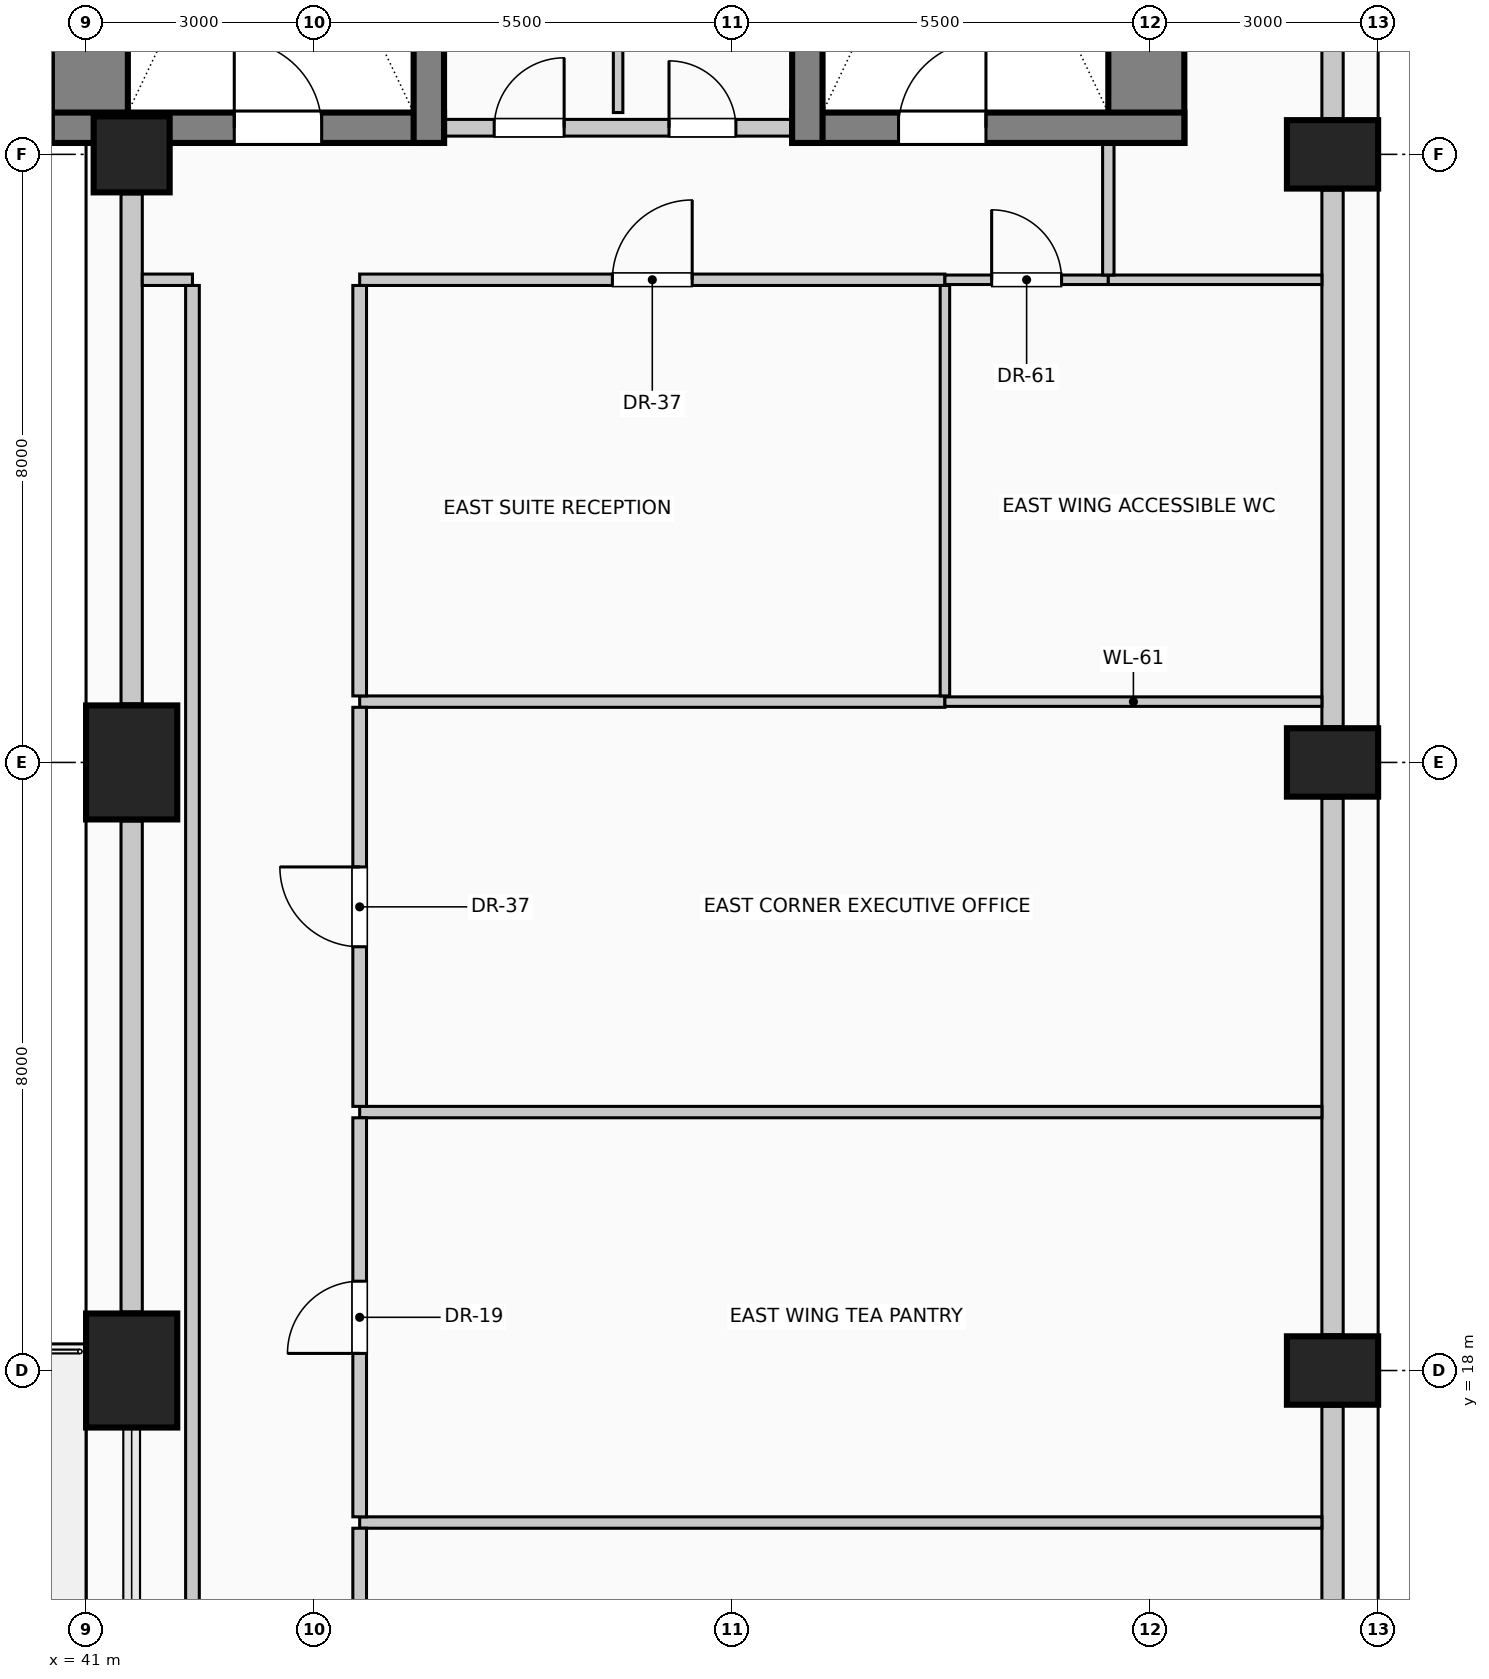
"""IFC4 building model, lengths in metres.
Left out: names, types, materials, properties, quantities, classifications, styles, units other than length and angle.
Written with IfcOpenShell. Run it as: python <this file> out.ifc"""

import sys

from ifc_helpers import new_model, si_unit, direction, frame, frame_2d, origin, origin_2d, place, context, subcontext, project, spatial, rectangle, circle, extrude, element, fill, save


model = new_model("IFC4")
c1 = context("Model", 3, precision=1e-05, world=origin(), true_north=direction((0.0, 1.0)))
c2 = subcontext(c1, "Body", "Model", "MODEL_VIEW")
j1 = project(units=[si_unit("LENGTHUNIT", "METRE"), si_unit("PLANEANGLEUNIT", "RADIAN")], contexts=[c1])
p1 = place(None, origin())
s1 = spatial("IfcSite", under=j1, at=p1, CompositionType="ELEMENT")
p2 = place(p1, origin())
s2 = spatial("IfcBuilding", under=s1, at=p2, CompositionType="ELEMENT")
p3 = place(p2, frame((0.0, 0.0, 22.6)))
s3 = spatial("IfcBuildingStorey", under=s2, at=p3, CompositionType="ELEMENT", Elevation=22.6)
for number, where, z_axis, x_axis in (
    (1, (41.05, 34.15, 0.0), (0.0, 0.0, 1.0), (0.0, 1.0, 0.0)),
    (2, (54.95, 34.15, 0.0), (0.0, 0.0, 1.0), (0.0, 1.0, 0.0)),
):
    element("IfcWall", number, at=place(p3, frame(where, z_axis=z_axis, x_axis=x_axis)), inside=s3, PredefinedType="SHEAR", context=c2, shape_type="SweptSolid", body=[
        extrude(rectangle(XDim=9.28, YDim=1.0, at=frame_2d((4.64, 0.0))), origin(), (0.0, 0.0, 1.0), 4.0),
    ])
p4 = place(p3, frame((40.55, 34.35, 0.0), z_axis=(0.0, 0.0, 1.0), x_axis=(1.0, 0.0, 0.0)))
e3 = element("IfcWall", 3, at=p4, inside=s3, PredefinedType="SHEAR", context=c2, shape_type="SweptSolid", body=[
    extrude(rectangle(XDim=5.16, YDim=0.4, at=frame_2d((2.58, 0.0))), origin(), (0.0, 0.0, 1.0), 4.0),
])
p5 = place(p4, frame((2.4, 0.0, 0.0)))
e4 = element("IfcOpeningElement", 4, at=p5, cuts=e3, PredefinedType="OPENING", context=c2, shape_type="SweptSolid", body=[
    extrude(rectangle(XDim=1.15, YDim=2.2, at=frame_2d((0.575, 1.1))), frame((0.0, 0.21, 0.0), z_axis=(0.0, -1.0, 0.0), x_axis=(1.0, 0.0, 0.0)), (0.0, 0.0, 1.0), 0.42),
])
p6 = place(p3, frame((45.51, 34.15, 0.0), z_axis=(0.0, 0.0, 1.0), x_axis=(0.0, 1.0, 0.0)))
e5 = element("IfcWall", 5, at=p6, inside=s3, PredefinedType="SHEAR", context=c2, shape_type="SweptSolid", body=[
    extrude(rectangle(XDim=9.28, YDim=0.4, at=frame_2d((4.64, 0.0))), origin(), (0.0, 0.0, 1.0), 4.0),
])
p7 = place(p3, frame((50.29, 34.35, 0.0), z_axis=(0.0, 0.0, 1.0), x_axis=(1.0, 0.0, 0.0)))
e6 = element("IfcWall", 6, at=p7, inside=s3, PredefinedType="SHEAR", context=c2, shape_type="SweptSolid", body=[
    extrude(rectangle(XDim=5.16, YDim=0.4, at=frame_2d((2.58, 0.0))), origin(), (0.0, 0.0, 1.0), 4.0),
])
p8 = place(p7, frame((1.4, 0.0, 0.0)))
e7 = element("IfcOpeningElement", 7, at=p8, cuts=e6, PredefinedType="OPENING", context=c2, shape_type="SweptSolid", body=[
    extrude(rectangle(XDim=1.15, YDim=2.2, at=frame_2d((0.575, 1.1))), frame((0.0, 0.21, 0.0), z_axis=(0.0, -1.0, 0.0), x_axis=(1.0, 0.0, 0.0)), (0.0, 0.0, 1.0), 0.42),
])
p9 = place(p3, frame((50.49, 34.15, 0.0), z_axis=(0.0, 0.0, 1.0), x_axis=(0.0, 1.0, 0.0)))
e8 = element("IfcWall", 8, at=p9, inside=s3, PredefinedType="SHEAR", context=c2, shape_type="SweptSolid", body=[
    extrude(rectangle(XDim=9.28, YDim=0.4, at=frame_2d((4.64, 0.0))), origin(), (0.0, 0.0, 1.0), 4.0),
])
for number, where, z_axis, x_axis in (
    (9, (57.4, 18.0, 0.0), (0.0, 0.0, 1.0), (0.0, 1.0, 0.0)),
    (10, (57.4, 26.0, 0.0), (0.0, 0.0, 1.0), (0.0, 1.0, 0.0)),
    (11, (57.4, 34.0, 0.0), (0.0, 0.0, 1.0), (0.0, 1.0, 0.0)),
):
    element("IfcColumn", number, at=place(p3, frame(where, z_axis=z_axis, x_axis=x_axis)), inside=s3, PredefinedType="COLUMN", context=c2, shape_type="SweptSolid", body=[
        extrude(rectangle(XDim=0.9, YDim=1.2, at=origin_2d()), origin(), (0.0, 0.0, 1.0), 4.0),
    ])
for number, where, z_axis, x_axis in (
    (12, (41.6, 18.0, 0.0), (0.0, 0.0, 1.0), (1.0, 0.0, 0.0)),
    (13, (41.6, 26.0, 0.0), (0.0, 0.0, 1.0), (1.0, 0.0, 0.0)),
):
    element("IfcColumn", number, at=place(p3, frame(where, z_axis=z_axis, x_axis=x_axis)), inside=s3, PredefinedType="COLUMN", context=c2, shape_type="SweptSolid", body=[
        extrude(rectangle(XDim=1.2, YDim=1.5, at=origin_2d()), origin(), (0.0, 0.0, 1.0), 4.0),
    ])
p10 = place(p3, frame((41.6, 34.0, 0.0), z_axis=(0.0, 0.0, 1.0), x_axis=(1.0, 0.0, 0.0)))
e14 = element("IfcColumn", 14, at=p10, inside=s3, PredefinedType="COLUMN", context=c2, shape_type="SweptSolid", body=[
    extrude(circle(Radius=0.5, at=origin_2d()), origin(), (0.0, 0.0, 1.0), 4.0),
])
p11 = place(p3, frame((57.4, 17.53, 0.0), z_axis=(0.0, 0.0, 1.0), x_axis=(0.0, -1.0, 0.0)))
e15 = element("IfcWall", 15, at=p11, inside=s3, PredefinedType="SOLIDWALL", context=c2, shape_type="SweptSolid", body=[
    extrude(rectangle(XDim=7.06, YDim=0.28, at=frame_2d((3.53, 0.0))), origin(), (0.0, 0.0, 1.0), 2.85),
])
p12 = place(p11, frame((3.973, 0.0, 0.42)))
e16 = element("IfcOpeningElement", 16, at=p12, cuts=e15, PredefinedType="OPENING", context=c2, shape_type="SweptSolid", body=[
    extrude(rectangle(XDim=2.2, YDim=1.95, at=frame_2d((1.1, 0.975))), frame((0.0, 0.15, 0.0), z_axis=(0.0, -1.0, 0.0), x_axis=(1.0, 0.0, 0.0)), (0.0, 0.0, 1.0), 0.3),
])
for number, where, z_axis, x_axis in (
    (17, (57.4, 25.53, 0.0), (0.0, 0.0, 1.0), (0.0, -1.0, 0.0)),
    (18, (57.4, 33.53, 0.0), (0.0, 0.0, 1.0), (0.0, -1.0, 0.0)),
):
    element("IfcWall", number, at=place(p3, frame(where, z_axis=z_axis, x_axis=x_axis)), inside=s3, PredefinedType="SOLIDWALL", context=c2, shape_type="SweptSolid", body=[
        extrude(rectangle(XDim=7.06, YDim=0.28, at=frame_2d((3.53, 0.0))), origin(), (0.0, 0.0, 1.0), 2.85),
    ])
p13 = place(p3, frame((57.4, 41.93, 0.0), z_axis=(0.0, 0.0, 1.0), x_axis=(0.0, -1.0, 0.0)))
e19 = element("IfcWall", 19, at=p13, inside=s3, PredefinedType="SOLIDWALL", context=c2, shape_type="SweptSolid", body=[
    extrude(rectangle(XDim=7.46, YDim=0.28, at=frame_2d((3.73, 0.0))), origin(), (0.0, 0.0, 1.0), 2.85),
])
p14 = place(p3, frame((41.6, 18.77, 0.0), z_axis=(0.0, 0.0, 1.0), x_axis=(0.0, 1.0, 0.0)))
e20 = element("IfcWall", 20, at=p14, inside=s3, PredefinedType="SOLIDWALL", context=c2, shape_type="SweptSolid", body=[
    extrude(rectangle(XDim=6.46, YDim=0.28, at=frame_2d((3.23, 0.0))), origin(), (0.0, 0.0, 1.0), 3.0),
])
p15 = place(p3, frame((41.6, 26.77, 0.0), z_axis=(0.0, 0.0, 1.0), x_axis=(0.0, 1.0, 0.0)))
e21 = element("IfcWall", 21, at=p15, inside=s3, PredefinedType="SOLIDWALL", context=c2, shape_type="SweptSolid", body=[
    extrude(rectangle(XDim=6.71, YDim=0.28, at=frame_2d((3.355, 0.0))), origin(), (0.0, 0.0, 1.0), 3.0),
])
p16 = place(p3, frame((45.72, 34.35, 0.0), z_axis=(0.0, 0.0, 1.0), x_axis=(1.0, 0.0, 0.0)))
e22 = element("IfcWall", 22, at=p16, inside=s3, PredefinedType="PARTITIONING", context=c2, shape_type="SweptSolid", body=[
    extrude(rectangle(XDim=4.56, YDim=0.22, at=frame_2d((2.28, 0.0))), origin(), (0.0, 0.0, 1.0), 3.7),
])
p17 = place(p16, frame((0.65, 0.0, 0.0)))
e23 = element("IfcOpeningElement", 23, at=p17, cuts=e22, PredefinedType="OPENING", context=c2, shape_type="SweptSolid", body=[
    extrude(rectangle(XDim=0.92, YDim=2.1, at=frame_2d((0.46, 1.05))), frame((0.0, 0.12, 0.0), z_axis=(0.0, -1.0, 0.0), x_axis=(1.0, 0.0, 0.0)), (0.0, 0.0, 1.0), 0.24),
])
p18 = place(p16, frame((2.95, 0.0, 0.0)))
e24 = element("IfcOpeningElement", 24, at=p18, cuts=e22, PredefinedType="OPENING", context=c2, shape_type="SweptSolid", body=[
    extrude(rectangle(XDim=0.88, YDim=2.1, at=frame_2d((0.44, 1.05))), frame((0.0, 0.12, 0.0), z_axis=(0.0, -1.0, 0.0), x_axis=(1.0, 0.0, 0.0)), (0.0, 0.0, 1.0), 0.24),
])
for number, where, z_axis, x_axis in (
    (25, (44.6, 16.0, 0.0), (0.0, 0.0, 1.0), (1.0, 0.0, 0.0)),
    (26, (44.6, 21.4, 0.0), (0.0, 0.0, 1.0), (1.0, 0.0, 0.0)),
):
    element("IfcWall", number, at=place(p3, frame(where, z_axis=z_axis, x_axis=x_axis)), inside=s3, PredefinedType="PARTITIONING", context=c2, shape_type="SweptSolid", body=[
        extrude(rectangle(XDim=12.66, YDim=0.15, at=frame_2d((6.33, 0.0))), origin(), (0.0, 0.0, 1.0), 3.7),
    ])
p19 = place(p3, frame((44.6, 26.8, 0.0), z_axis=(0.0, 0.0, 1.0), x_axis=(1.0, 0.0, 0.0)))
e27 = element("IfcWall", 27, at=p19, inside=s3, PredefinedType="PARTITIONING", context=c2, shape_type="SweptSolid", body=[
    extrude(rectangle(XDim=7.7, YDim=0.15, at=frame_2d((3.85, 0.0))), origin(), (0.0, 0.0, 1.0), 3.7),
])
p20 = place(p3, frame((52.3, 26.8, 0.0), z_axis=(0.0, 0.0, 1.0), x_axis=(1.0, 0.0, 0.0)))
e28 = element("IfcWall", 28, at=p20, inside=s3, PredefinedType="PARTITIONING", context=c2, shape_type="SweptSolid", body=[
    extrude(rectangle(XDim=4.96, YDim=0.125, at=frame_2d((2.48, 0.0))), origin(), (0.0, 0.0, 1.0), 3.7),
])
p21 = place(p3, frame((41.74, 32.35, 0.0), z_axis=(0.0, 0.0, 1.0), x_axis=(1.0, 0.0, 0.0)))
e29 = element("IfcWall", 29, at=p21, inside=s3, PredefinedType="PARTITIONING", context=c2, shape_type="SweptSolid", body=[
    extrude(rectangle(XDim=0.66, YDim=0.15, at=frame_2d((0.33, 0.0))), origin(), (0.0, 0.0, 1.0), 3.7),
])
p22 = place(p3, frame((44.6, 32.35, 0.0), z_axis=(0.0, 0.0, 1.0), x_axis=(1.0, 0.0, 0.0)))
e30 = element("IfcWall", 30, at=p22, inside=s3, PredefinedType="PARTITIONING", context=c2, shape_type="SweptSolid", body=[
    extrude(rectangle(XDim=7.7, YDim=0.15, at=frame_2d((3.85, 0.0))), origin(), (0.0, 0.0, 1.0), 3.7),
])
p23 = place(p22, frame((3.325, 0.0, 0.0)))
e31 = element("IfcOpeningElement", 31, at=p23, cuts=e30, PredefinedType="OPENING", context=c2, shape_type="SweptSolid", body=[
    extrude(rectangle(XDim=1.05, YDim=2.15, at=frame_2d((0.525, 1.075))), frame((0.0, 0.085, 0.0), z_axis=(0.0, -1.0, 0.0), x_axis=(1.0, 0.0, 0.0)), (0.0, 0.0, 1.0), 0.17),
])
p24 = place(p3, frame((52.3, 32.35, 0.0), z_axis=(0.0, 0.0, 1.0), x_axis=(1.0, 0.0, 0.0)))
e32 = element("IfcWall", 32, at=p24, inside=s3, PredefinedType="PARTITIONING", context=c2, shape_type="SweptSolid", body=[
    extrude(rectangle(XDim=2.15, YDim=0.125, at=frame_2d((1.075, 0.0))), origin(), (0.0, 0.0, 1.0), 3.7),
])
p25 = place(p24, frame((0.615, 0.0, 0.0)))
e33 = element("IfcOpeningElement", 33, at=p25, cuts=e32, PredefinedType="OPENING", context=c2, shape_type="SweptSolid", body=[
    extrude(rectangle(XDim=0.92, YDim=2.1, at=frame_2d((0.46, 1.05))), frame((0.0, 0.073, 0.0), z_axis=(0.0, -1.0, 0.0), x_axis=(1.0, 0.0, 0.0)), (0.0, 0.0, 1.0), 0.145),
])
p26 = place(p3, frame((54.45, 32.35, 0.0), z_axis=(0.0, 0.0, 1.0), x_axis=(1.0, 0.0, 0.0)))
e34 = element("IfcWall", 34, at=p26, inside=s3, PredefinedType="PARTITIONING", context=c2, shape_type="SweptSolid", body=[
    extrude(rectangle(XDim=2.81, YDim=0.125, at=frame_2d((1.405, 0.0))), origin(), (0.0, 0.0, 1.0), 3.7),
])
p27 = place(p3, frame((42.4, 6.89, 0.0), z_axis=(0.0, 0.0, 1.0), x_axis=(0.0, 1.0, 0.0)))
e35 = element("IfcWall", 35, at=p27, inside=s3, PredefinedType="PARTITIONING", context=c2, shape_type="SweptSolid", body=[
    extrude(rectangle(XDim=25.385, YDim=0.18, at=frame_2d((12.692, 0.0))), origin(), (0.0, 0.0, 1.0), 3.7),
])
p28 = place(p3, frame((44.6, 6.89, 0.0), z_axis=(0.0, 0.0, 1.0), x_axis=(0.0, 1.0, 0.0)))
e36 = element("IfcWall", 36, at=p28, inside=s3, PredefinedType="PARTITIONING", context=c2, shape_type="SweptSolid", body=[
    extrude(rectangle(XDim=9.035, YDim=0.18, at=frame_2d((4.518, 0.0))), origin(), (0.0, 0.0, 1.0), 3.7),
])
p29 = place(p28, frame((3.992, 0.0, 0.0)))
e37 = element("IfcOpeningElement", 37, at=p29, cuts=e36, PredefinedType="OPENING", context=c2, shape_type="SweptSolid", body=[
    extrude(rectangle(XDim=1.05, YDim=2.15, at=frame_2d((0.525, 1.075))), frame((0.0, 0.1, 0.0), z_axis=(0.0, -1.0, 0.0), x_axis=(1.0, 0.0, 0.0)), (0.0, 0.0, 1.0), 0.2),
])
p30 = place(p3, frame((44.6, 16.075, 0.0), z_axis=(0.0, 0.0, 1.0), x_axis=(0.0, 1.0, 0.0)))
e38 = element("IfcWall", 38, at=p30, inside=s3, PredefinedType="PARTITIONING", context=c2, shape_type="SweptSolid", body=[
    extrude(rectangle(XDim=5.25, YDim=0.18, at=frame_2d((2.625, 0.0))), origin(), (0.0, 0.0, 1.0), 3.7),
])
p31 = place(p30, frame((2.15, 0.0, 0.0)))
e39 = element("IfcOpeningElement", 39, at=p31, cuts=e38, PredefinedType="OPENING", context=c2, shape_type="SweptSolid", body=[
    extrude(rectangle(XDim=0.95, YDim=2.15, at=frame_2d((0.475, 1.075))), frame((0.0, 0.1, 0.0), z_axis=(0.0, -1.0, 0.0), x_axis=(1.0, 0.0, 0.0)), (0.0, 0.0, 1.0), 0.2),
])
p32 = place(p3, frame((44.6, 21.475, 0.0), z_axis=(0.0, 0.0, 1.0), x_axis=(0.0, 1.0, 0.0)))
e40 = element("IfcWall", 40, at=p32, inside=s3, PredefinedType="PARTITIONING", context=c2, shape_type="SweptSolid", body=[
    extrude(rectangle(XDim=5.25, YDim=0.18, at=frame_2d((2.625, 0.0))), origin(), (0.0, 0.0, 1.0), 3.7),
])
p33 = place(p32, frame((2.1, 0.0, 0.0)))
e41 = element("IfcOpeningElement", 41, at=p33, cuts=e40, PredefinedType="OPENING", context=c2, shape_type="SweptSolid", body=[
    extrude(rectangle(XDim=1.05, YDim=2.15, at=frame_2d((0.525, 1.075))), frame((0.0, 0.1, 0.0), z_axis=(0.0, -1.0, 0.0), x_axis=(1.0, 0.0, 0.0)), (0.0, 0.0, 1.0), 0.2),
])
p34 = place(p3, frame((44.6, 26.875, 0.0), z_axis=(0.0, 0.0, 1.0), x_axis=(0.0, 1.0, 0.0)))
e42 = element("IfcWall", 42, at=p34, inside=s3, PredefinedType="PARTITIONING", context=c2, shape_type="SweptSolid", body=[
    extrude(rectangle(XDim=5.4, YDim=0.18, at=frame_2d((2.7, 0.0))), origin(), (0.0, 0.0, 1.0), 3.7),
])
p35 = place(p3, frame((48.0, 34.55, 0.0), z_axis=(0.0, 0.0, 1.0), x_axis=(0.0, 1.0, 0.0)))
e43 = element("IfcWall", 43, at=p35, inside=s3, PredefinedType="PARTITIONING", context=c2, shape_type="SweptSolid", body=[
    extrude(rectangle(XDim=7.475, YDim=0.125, at=frame_2d((3.737, 0.0))), origin(), (0.0, 0.0, 1.0), 3.7),
])
p36 = place(p3, frame((52.3, 26.875, 0.0), z_axis=(0.0, 0.0, 1.0), x_axis=(0.0, 1.0, 0.0)))
e44 = element("IfcWall", 44, at=p36, inside=s3, PredefinedType="PARTITIONING", context=c2, shape_type="SweptSolid", body=[
    extrude(rectangle(XDim=5.4, YDim=0.125, at=frame_2d((2.7, 0.0))), origin(), (0.0, 0.0, 1.0), 3.7),
])
p37 = place(p3, frame((54.45, 32.413, 0.0), z_axis=(0.0, 0.0, 1.0), x_axis=(0.0, 1.0, 0.0)))
e45 = element("IfcWall", 45, at=p37, inside=s3, PredefinedType="PARTITIONING", context=c2, shape_type="SweptSolid", body=[
    extrude(rectangle(XDim=1.737, YDim=0.15, at=frame_2d((0.869, 0.0))), origin(), (0.0, 0.0, 1.0), 3.7),
])
p38 = place(p5, origin())
e46 = element("IfcDoor", 46, at=p38, inside=s3, OperationType="SINGLE_SWING_LEFT", PredefinedType="DOOR", context=c2, shape_type="SweptSolid", body=[
    extrude(rectangle(XDim=1.15, YDim=2.2, at=frame_2d((0.575, 1.1))), frame((0.0, 0.025, 0.0), z_axis=(0.0, -1.0, 0.0), x_axis=(1.0, 0.0, 0.0)), (0.0, 0.0, 1.0), 0.05),
])
fill(e4, e46)
p39 = place(p17, origin())
e47 = element("IfcDoor", 47, at=p39, inside=s3, OperationType="SINGLE_SWING_RIGHT", PredefinedType="DOOR", context=c2, shape_type="SweptSolid", body=[
    extrude(rectangle(XDim=0.92, YDim=2.1, at=frame_2d((0.46, 1.05))), frame((0.0, 0.025, 0.0), z_axis=(0.0, -1.0, 0.0), x_axis=(1.0, 0.0, 0.0)), (0.0, 0.0, 1.0), 0.05),
])
fill(e23, e47)
p40 = place(p18, origin())
e48 = element("IfcDoor", 48, at=p40, inside=s3, OperationType="SINGLE_SWING_LEFT", PredefinedType="DOOR", context=c2, shape_type="SweptSolid", body=[
    extrude(rectangle(XDim=0.88, YDim=2.1, at=frame_2d((0.44, 1.05))), frame((0.0, 0.025, 0.0), z_axis=(0.0, -1.0, 0.0), x_axis=(1.0, 0.0, 0.0)), (0.0, 0.0, 1.0), 0.05),
])
fill(e24, e48)
p41 = place(p8, origin())
e49 = element("IfcDoor", 49, at=p41, inside=s3, OperationType="SINGLE_SWING_RIGHT", PredefinedType="DOOR", context=c2, shape_type="SweptSolid", body=[
    extrude(rectangle(XDim=1.15, YDim=2.2, at=frame_2d((0.575, 1.1))), frame((0.0, 0.025, 0.0), z_axis=(0.0, -1.0, 0.0), x_axis=(1.0, 0.0, 0.0)), (0.0, 0.0, 1.0), 0.05),
])
fill(e7, e49)
p42 = place(p23, origin())
e50 = element("IfcDoor", 50, at=p42, inside=s3, OperationType="SINGLE_SWING_RIGHT", PredefinedType="DOOR", context=c2, shape_type="SweptSolid", body=[
    extrude(rectangle(XDim=1.05, YDim=2.15, at=frame_2d((0.525, 1.075))), frame((0.0, 0.025, 0.0), z_axis=(0.0, -1.0, 0.0), x_axis=(1.0, 0.0, 0.0)), (0.0, 0.0, 1.0), 0.05),
])
fill(e31, e50)
p43 = place(p25, origin())
e51 = element("IfcDoor", 51, at=p43, inside=s3, OperationType="SINGLE_SWING_LEFT", PredefinedType="DOOR", context=c2, shape_type="SweptSolid", body=[
    extrude(rectangle(XDim=0.92, YDim=2.1, at=frame_2d((0.46, 1.05))), frame((0.0, 0.025, 0.0), z_axis=(0.0, -1.0, 0.0), x_axis=(1.0, 0.0, 0.0)), (0.0, 0.0, 1.0), 0.05),
])
fill(e33, e51)
p44 = place(p31, origin())
e52 = element("IfcDoor", 52, at=p44, inside=s3, OperationType="SINGLE_SWING_LEFT", PredefinedType="DOOR", context=c2, shape_type="SweptSolid", body=[
    extrude(rectangle(XDim=0.95, YDim=2.15, at=frame_2d((0.475, 1.075))), frame((0.0, 0.025, 0.0), z_axis=(0.0, -1.0, 0.0), x_axis=(1.0, 0.0, 0.0)), (0.0, 0.0, 1.0), 0.05),
])
fill(e39, e52)
p45 = place(p33, origin())
e53 = element("IfcDoor", 53, at=p45, inside=s3, OperationType="SINGLE_SWING_RIGHT", PredefinedType="DOOR", context=c2, shape_type="SweptSolid", body=[
    extrude(rectangle(XDim=1.05, YDim=2.15, at=frame_2d((0.525, 1.075))), frame((0.0, 0.025, 0.0), z_axis=(0.0, -1.0, 0.0), x_axis=(1.0, 0.0, 0.0)), (0.0, 0.0, 1.0), 0.05),
])
fill(e41, e53)
save(model, sys.argv[1])
